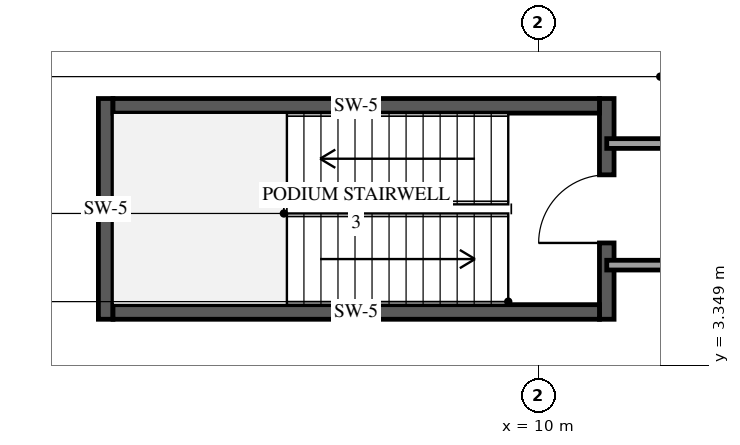
"""IFC4 building model, lengths in metres.
Left out: names, types, materials, properties, quantities, classifications, styles, units other than length and angle.
Written with IfcOpenShell. Run it as: python <this file> out.ifc"""

import sys

from ifc_helpers import new_model, si_unit, direction, frame, frame_2d, origin, place, context, subcontext, project, spatial, rectangle, extrude, element, fill, save


model = new_model("IFC4")
c1 = context("Model", 3, precision=1e-05, world=origin(), true_north=direction((0.0, 1.0)))
c2 = subcontext(c1, "Body", "Model", "MODEL_VIEW")
j1 = project(units=[si_unit("LENGTHUNIT", "METRE"), si_unit("PLANEANGLEUNIT", "RADIAN")], contexts=[c1])
p1 = place(None, origin())
s1 = spatial("IfcSite", under=j1, at=p1, CompositionType="ELEMENT")
p2 = place(p1, origin())
s2 = spatial("IfcBuilding", under=s1, at=p2, CompositionType="ELEMENT")
p3 = place(p2, frame((0.0, 0.0, -10.2)))
s3 = spatial("IfcBuildingStorey", under=s2, at=p3, CompositionType="ELEMENT", Elevation=-10.2)
p4 = place(p3, frame((2.88, 4.11, -0.4), z_axis=(0.0, 0.0, 1.0), x_axis=(0.0, 1.0, 0.0)))
e1 = element("IfcWall", 1, at=p4, inside=s3, PredefinedType="SHEAR", context=c2, shape_type="SweptSolid", body=[
    extrude(rectangle(XDim=3.63, YDim=0.24, at=frame_2d((1.815, 0.0))), origin(), (0.0, 0.0, 1.0), 5.2),
])
p5 = place(p3, frame((11.12, 4.11, -0.4), z_axis=(0.0, 0.0, 1.0), x_axis=(0.0, 1.0, 0.0)))
e2 = element("IfcWall", 2, at=p5, inside=s3, PredefinedType="SHEAR", context=c2, shape_type="SweptSolid", body=[
    extrude(rectangle(XDim=3.63, YDim=0.24, at=frame_2d((1.815, 0.0))), origin(), (0.0, 0.0, 1.0), 5.2),
])
p6 = place(p5, frame((1.255, 0.0, 0.4)))
e3 = element("IfcOpeningElement", 3, at=p6, cuts=e2, PredefinedType="OPENING", context=c2, shape_type="SweptSolid", body=[
    extrude(rectangle(XDim=1.12, YDim=2.15, at=frame_2d((0.56, 1.075))), frame((0.0, 0.13, 0.0), z_axis=(0.0, -1.0, 0.0), x_axis=(1.0, 0.0, 0.0)), (0.0, 0.0, 1.0), 0.26),
])
for number, where, z_axis, x_axis in (
    (4, (3.0, 4.23, -0.4), (0.0, 0.0, 1.0), (1.0, 0.0, 0.0)),
    (5, (3.0, 7.62, -0.4), (0.0, 0.0, 1.0), (1.0, 0.0, 0.0)),
):
    element("IfcWall", number, at=place(p3, frame(where, z_axis=z_axis, x_axis=x_axis)), inside=s3, PredefinedType="SHEAR", context=c2, shape_type="SweptSolid", body=[
        extrude(rectangle(XDim=8.0, YDim=0.24, at=frame_2d((4.0, 0.0))), origin(), (0.0, 0.0, 1.0), 5.2),
    ])
p7 = place(p3, frame((38.53, 5.0, 0.0), z_axis=(0.0, 0.0, 1.0), x_axis=(-1.0, 0.0, 0.0)))
e6 = element("IfcWall", 6, at=p7, inside=s3, PredefinedType="PARTITIONING", context=c2, shape_type="SweptSolid", body=[
    extrude(rectangle(XDim=27.41, YDim=0.16, at=frame_2d((13.705, 0.0))), origin(), (0.0, 0.0, 1.0), 4.44),
])
p8 = place(p7, frame((13.23, 0.0, 0.0)))
e7 = element("IfcOpeningElement", 7, at=p8, cuts=e6, PredefinedType="OPENING", context=c2, shape_type="SweptSolid", body=[
    extrude(rectangle(XDim=0.95, YDim=2.15, at=frame_2d((0.475, 1.075))), frame((0.0, 0.09, 0.0), z_axis=(0.0, -1.0, 0.0), x_axis=(1.0, 0.0, 0.0)), (0.0, 0.0, 1.0), 0.18),
])
p9 = place(p3, frame((11.12, 7.0, 0.0), z_axis=(0.0, 0.0, 1.0), x_axis=(1.0, 0.0, 0.0)))
e8 = element("IfcWall", 8, at=p9, inside=s3, PredefinedType="PARTITIONING", context=c2, shape_type="SweptSolid", body=[
    extrude(rectangle(XDim=19.41, YDim=0.16, at=frame_2d((9.705, 0.0))), origin(), (0.0, 0.0, 1.0), 4.44),
])
p10 = place(p6, origin())
e9 = element("IfcDoor", 9, at=p10, inside=s3, OperationType="SINGLE_SWING_LEFT", PredefinedType="DOOR", context=c2, shape_type="SweptSolid", body=[
    extrude(rectangle(XDim=1.12, YDim=2.15, at=frame_2d((0.56, 1.075))), frame((0.0, 0.025, 0.0), z_axis=(0.0, -1.0, 0.0), x_axis=(1.0, 0.0, 0.0)), (0.0, 0.0, 1.0), 0.05),
])
fill(e3, e9)
save(model, sys.argv[1])
